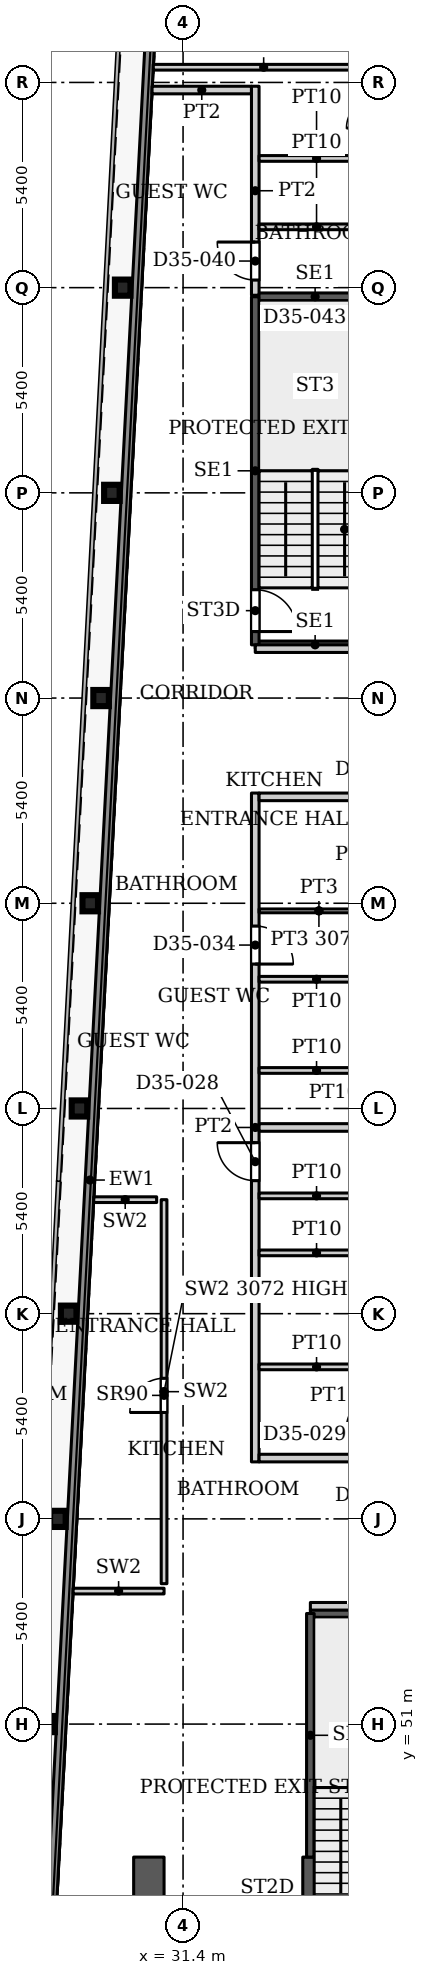
"""IFC4 building model, lengths in metres.
Left out: names, types, materials, properties, quantities, classifications, styles, units other than length and angle.
Written with IfcOpenShell. Run it as: python <this file> out.ifc"""

import sys

from ifc_helpers import new_model, si_unit, direction, frame, frame_2d, origin, origin_2d, place, context, subcontext, project, spatial, rectangle, i_section, extrude, source, transform, mapped, element, fill, save


model = new_model("IFC4")
c1 = context("Model", 3, precision=1e-05, world=origin(), true_north=direction((0.0, 1.0)))
c2 = subcontext(c1, "Body", "Model", "MODEL_VIEW")
j1 = project(units=[si_unit("LENGTHUNIT", "METRE"), si_unit("PLANEANGLEUNIT", "RADIAN")], contexts=[c1])
p1 = place(None, origin())
s1 = spatial("IfcSite", under=j1, at=p1, CompositionType="ELEMENT")
p2 = place(p1, origin())
s2 = spatial("IfcBuilding", under=s1, at=p2, CompositionType="ELEMENT")
p3 = place(p2, frame((0.0, 0.0, 152.6)))
s3 = spatial("IfcBuildingStorey", under=s2, at=p3, CompositionType="ELEMENT", Elevation=152.6)
for number, where, z_axis, x_axis in (
    (1, (27.822, 51.0, 0.0), (0.0, 0.0, 1.0), (1.0, 0.0, 0.0)),
    (2, (28.106, 56.4, 0.0), (0.0, 0.0, 1.0), (1.0, 0.0, 0.0)),
    (3, (28.39, 61.8, 0.0), (0.0, 0.0, 1.0), (1.0, 0.0, 0.0)),
    (4, (28.674, 67.2, 0.0), (0.0, 0.0, 1.0), (1.0, 0.0, 0.0)),
    (5, (28.958, 72.6, 0.0), (0.0, 0.0, 1.0), (1.0, 0.0, 0.0)),
    (6, (29.243, 78.0, 0.0), (0.0, 0.0, 1.0), (1.0, 0.0, 0.0)),
    (7, (29.527, 83.4, 0.0), (0.0, 0.0, 1.0), (1.0, 0.0, 0.0)),
    (8, (29.811, 88.8, 0.0), (0.0, 0.0, 1.0), (1.0, 0.0, 0.0)),
):
    element("IfcColumn", number, at=place(p3, frame(where, z_axis=z_axis, x_axis=x_axis)), inside=s3, PredefinedType="COLUMN", context=c2, shape_type="SweptSolid", body=[
        extrude(i_section(OverallWidth=0.409, OverallDepth=0.425, WebThickness=0.033, FlangeThickness=0.052, FilletRadius=0.013, at=origin_2d()), origin(), (0.0, 0.0, 1.0), 3.9),
    ])
p4 = place(p3, frame((34.75, 29.05, 0.0), z_axis=(0.0, 0.0, 1.0), x_axis=(0.0, 1.0, 0.0)))
e9 = element("IfcWall", 9, at=p4, inside=s3, PredefinedType="SHEAR", context=c2, shape_type="SweptSolid", body=[
    extrude(rectangle(XDim=18.45, YDim=0.4, at=frame_2d((9.225, 0.0))), origin(), (0.0, 0.0, 1.0), 3.9),
])
p5 = place(p4, frame((8.025, 0.0, 0.0)))
e10 = element("IfcOpeningElement", 10, at=p5, cuts=e9, PredefinedType="OPENING", context=c2, shape_type="SweptSolid", body=[
    extrude(rectangle(XDim=1.1, YDim=2.2, at=frame_2d((0.55, 1.1))), frame((0.0, 0.21, 0.0), z_axis=(0.0, -1.0, 0.0), x_axis=(1.0, 0.0, 0.0)), (0.0, 0.0, 1.0), 0.42),
])
p6 = place(p4, frame((10.875, 0.0, 0.0)))
e11 = element("IfcOpeningElement", 11, at=p6, cuts=e9, PredefinedType="OPENING", context=c2, shape_type="SweptSolid", body=[
    extrude(rectangle(XDim=1.1, YDim=2.2, at=frame_2d((0.55, 1.1))), frame((0.0, 0.21, 0.0), z_axis=(0.0, -1.0, 0.0), x_axis=(1.0, 0.0, 0.0)), (0.0, 0.0, 1.0), 0.42),
])
p7 = place(p4, frame((13.725, 0.0, 0.0)))
e12 = element("IfcOpeningElement", 12, at=p7, cuts=e9, PredefinedType="OPENING", context=c2, shape_type="SweptSolid", body=[
    extrude(rectangle(XDim=1.1, YDim=2.2, at=frame_2d((0.55, 1.1))), frame((0.0, 0.21, 0.0), z_axis=(0.0, -1.0, 0.0), x_axis=(1.0, 0.0, 0.0)), (0.0, 0.0, 1.0), 0.42),
])
p8 = place(p4, frame((15.95, 0.0, 0.0)))
e13 = element("IfcOpeningElement", 13, at=p8, cuts=e9, PredefinedType="OPENING", context=c2, shape_type="SweptSolid", body=[
    extrude(rectangle(XDim=1.1, YDim=2.2, at=frame_2d((0.55, 1.1))), frame((0.0, 0.21, 0.0), z_axis=(0.0, -1.0, 0.0), x_axis=(1.0, 0.0, 0.0)), (0.0, 0.0, 1.0), 0.42),
])
p9 = place(p3, frame((30.5, 29.05, 0.0), z_axis=(0.0, 0.0, 1.0), x_axis=(0.0, 1.0, 0.0)))
e14 = element("IfcWall", 14, at=p9, inside=s3, PredefinedType="SHEAR", context=c2, shape_type="SweptSolid", body=[
    extrude(rectangle(XDim=18.45, YDim=0.8, at=frame_2d((9.225, 0.0))), origin(), (0.0, 0.0, 1.0), 3.9),
])
p10 = place(p9, frame((6.55, 0.0, 0.0)))
e15 = element("IfcOpeningElement", 15, at=p10, cuts=e14, PredefinedType="OPENING", context=c2, shape_type="SweptSolid", body=[
    extrude(rectangle(XDim=0.9, YDim=2.2, at=frame_2d((0.45, 1.1))), frame((0.0, 0.41, 0.0), z_axis=(0.0, -1.0, 0.0), x_axis=(1.0, 0.0, 0.0)), (0.0, 0.0, 1.0), 0.82),
])
p11 = place(p9, frame((11.025, 0.0, 0.0)))
e16 = element("IfcOpeningElement", 16, at=p11, cuts=e14, PredefinedType="OPENING", context=c2, shape_type="SweptSolid", body=[
    extrude(rectangle(XDim=0.9, YDim=2.2, at=frame_2d((0.45, 1.1))), frame((0.0, 0.41, 0.0), z_axis=(0.0, -1.0, 0.0), x_axis=(1.0, 0.0, 0.0)), (0.0, 0.0, 1.0), 0.82),
])
p12 = place(p3, frame((27.195, 31.969, 0.0), z_axis=(0.0, 0.0, 1.0), x_axis=(0.052554995867, 0.998618031286, 0.0)))
e17 = element("IfcWall", 17, at=p12, inside=s3, PredefinedType="SOLIDWALL", context=c2, shape_type="SweptSolid", body=[
    extrude(rectangle(XDim=66.787, YDim=0.25, at=frame_2d((33.394, 0.0))), origin(), (0.0, 0.0, 1.0), 3.75),
])
p13 = place(p3, frame((34.75, 53.91, 0.0), z_axis=(0.0, 0.0, 1.0), x_axis=(1.0, 0.0, 0.0)))
e18 = element("IfcWall", 18, at=p13, inside=s3, PredefinedType="SHEAR", context=c2, shape_type="SweptSolid", body=[
    extrude(rectangle(XDim=3.15, YDim=0.2, at=frame_2d((1.575, 0.0))), origin(), (0.0, 0.0, 1.0), 3.9),
])
p14 = place(p3, frame((34.75, 47.5, 0.0), z_axis=(0.0, 0.0, 1.0), x_axis=(0.0, 1.0, 0.0)))
e19 = element("IfcWall", 19, at=p14, inside=s3, PredefinedType="SHEAR", context=c2, shape_type="SweptSolid", body=[
    extrude(rectangle(XDim=6.41, YDim=0.2, at=frame_2d((3.205, 0.0))), origin(), (0.0, 0.0, 1.0), 3.9),
])
for number, where, z_axis, x_axis in (
    (20, (33.3, 79.4, 0.0), (0.0, 0.0, 1.0), (1.0, 0.0, 0.0)),
    (21, (33.3, 88.56, 0.0), (0.0, 0.0, 1.0), (1.0, 0.0, 0.0)),
):
    element("IfcWall", number, at=place(p3, frame(where, z_axis=z_axis, x_axis=x_axis)), inside=s3, PredefinedType="SHEAR", context=c2, shape_type="SweptSolid", body=[
        extrude(rectangle(XDim=3.15, YDim=0.2, at=frame_2d((1.575, 0.0))), origin(), (0.0, 0.0, 1.0), 3.9),
    ])
p15 = place(p3, frame((33.3, 79.4, 0.0), z_axis=(0.0, 0.0, 1.0), x_axis=(0.0, 1.0, 0.0)))
e22 = element("IfcWall", 22, at=p15, inside=s3, PredefinedType="SHEAR", context=c2, shape_type="SweptSolid", body=[
    extrude(rectangle(XDim=9.16, YDim=0.2, at=frame_2d((4.58, 0.0))), origin(), (0.0, 0.0, 1.0), 3.9),
])
p16 = place(p15, frame((0.35, 0.0, 0.0)))
e23 = element("IfcOpeningElement", 23, at=p16, cuts=e22, PredefinedType="OPENING", context=c2, shape_type="SweptSolid", body=[
    extrude(rectangle(XDim=1.1, YDim=2.2, at=frame_2d((0.55, 1.1))), frame((0.0, 0.11, 0.0), z_axis=(0.0, -1.0, 0.0), x_axis=(1.0, 0.0, 0.0)), (0.0, 0.0, 1.0), 0.22),
])
p17 = place(p3, frame((28.508, 54.5, 0.0), z_axis=(0.0, 0.0, 1.0), x_axis=(1.0, 0.0, 0.0)))
e24 = element("IfcWall", 24, at=p17, inside=s3, PredefinedType="PARTITIONING", context=c2, shape_type="SweptSolid", body=[
    extrude(rectangle(XDim=2.392, YDim=0.15, at=frame_2d((1.196, 0.0))), origin(), (0.0, 0.0, 1.0), 3.9),
])
p18 = place(p3, frame((30.9, 54.695, 0.0), z_axis=(0.0, 0.0, 1.0), x_axis=(0.0, 1.0, 0.0)))
e25 = element("IfcWall", 25, at=p18, inside=s3, PredefinedType="PARTITIONING", context=c2, shape_type="SweptSolid", body=[
    extrude(rectangle(XDim=10.105, YDim=0.15, at=frame_2d((5.052, 0.0))), origin(), (0.0, 0.0, 1.0), 3.072),
])
p19 = place(p18, frame((4.505, 0.0, 0.0)))
e26 = element("IfcOpeningElement", 26, at=p19, cuts=e25, PredefinedType="OPENING", context=c2, shape_type="SweptSolid", body=[
    extrude(rectangle(XDim=0.9, YDim=2.2, at=frame_2d((0.45, 1.1))), frame((0.0, 0.085, 0.0), z_axis=(0.0, -1.0, 0.0), x_axis=(1.0, 0.0, 0.0)), (0.0, 0.0, 1.0), 0.17),
])
p20 = place(p3, frame((29.05, 64.8, 0.0), z_axis=(0.0, 0.0, 1.0), x_axis=(1.0, 0.0, 0.0)))
e27 = element("IfcWall", 27, at=p20, inside=s3, PredefinedType="PARTITIONING", context=c2, shape_type="SweptSolid", body=[
    extrude(rectangle(XDim=1.655, YDim=0.15, at=frame_2d((0.828, 0.0))), origin(), (0.0, 0.0, 1.0), 3.9),
])
p21 = place(p3, frame((30.617, 94.6, 0.0), z_axis=(0.0, 0.0, 1.0), x_axis=(1.0, 0.0, 0.0)))
e28 = element("IfcWall", 28, at=p21, inside=s3, PredefinedType="PARTITIONING", context=c2, shape_type="SweptSolid", body=[
    extrude(rectangle(XDim=5.808, YDim=0.15, at=frame_2d((2.904, 0.0))), origin(), (0.0, 0.0, 1.0), 3.6),
])
p22 = place(p3, frame((30.585, 94.0, 0.0), z_axis=(0.0, 0.0, 1.0), x_axis=(1.0, 0.0, 0.0)))
e29 = element("IfcWall", 29, at=p22, inside=s3, PredefinedType="PARTITIONING", context=c2, shape_type="SweptSolid", body=[
    extrude(rectangle(XDim=2.615, YDim=0.2, at=frame_2d((1.308, 0.0))), origin(), (0.0, 0.0, 1.0), 3.6),
])
p23 = place(p3, frame((33.3, 57.9, 0.0), z_axis=(0.0, 0.0, 1.0), x_axis=(0.0, 1.0, 0.0)))
e30 = element("IfcWall", 30, at=p23, inside=s3, PredefinedType="PARTITIONING", context=c2, shape_type="SweptSolid", body=[
    extrude(rectangle(XDim=17.6, YDim=0.2, at=frame_2d((8.8, 0.0))), origin(), (0.0, 0.0, 1.0), 3.6),
])
p24 = place(p23, frame((7.4, 0.0, 0.0)))
e31 = element("IfcOpeningElement", 31, at=p24, cuts=e30, PredefinedType="OPENING", context=c2, shape_type="SweptSolid", body=[
    extrude(rectangle(XDim=1.0, YDim=2.1, at=frame_2d((0.5, 1.05))), frame((0.0, 0.11, 0.0), z_axis=(0.0, -1.0, 0.0), x_axis=(1.0, 0.0, 0.0)), (0.0, 0.0, 1.0), 0.22),
])
p25 = place(p23, frame((13.1, 0.0, 0.0)))
e32 = element("IfcOpeningElement", 32, at=p25, cuts=e30, PredefinedType="OPENING", context=c2, shape_type="SweptSolid", body=[
    extrude(rectangle(XDim=1.0, YDim=2.1, at=frame_2d((0.5, 1.05))), frame((0.0, 0.11, 0.0), z_axis=(0.0, -1.0, 0.0), x_axis=(1.0, 0.0, 0.0)), (0.0, 0.0, 1.0), 0.22),
])
p26 = place(p3, frame((33.3, 79.3, 0.0), z_axis=(0.0, 0.0, 1.0), x_axis=(1.0, 0.0, 0.0)))
e33 = element("IfcWall", 33, at=p26, inside=s3, PredefinedType="PARTITIONING", context=c2, shape_type="SweptSolid", body=[
    extrude(rectangle(XDim=12.6, YDim=0.2, at=frame_2d((6.3, 0.0))), origin(), (0.0, 0.0, 1.0), 3.6),
])
p27 = place(p26, frame((5.795, 0.0, 0.0)))
e34 = element("IfcOpeningElement", 34, at=p27, cuts=e33, PredefinedType="OPENING", context=c2, shape_type="SweptSolid", body=[
    extrude(rectangle(XDim=1.0, YDim=2.1, at=frame_2d((0.5, 1.05))), frame((0.0, 0.11, 0.0), z_axis=(0.0, -1.0, 0.0), x_axis=(1.0, 0.0, 0.0)), (0.0, 0.0, 1.0), 0.22),
])
p28 = place(p3, frame((33.3, 88.6, 0.0), z_axis=(0.0, 0.0, 1.0), x_axis=(0.0, 1.0, 0.0)))
e35 = element("IfcWall", 35, at=p28, inside=s3, PredefinedType="PARTITIONING", context=c2, shape_type="SweptSolid", body=[
    extrude(rectangle(XDim=5.5, YDim=0.2, at=frame_2d((2.75, 0.0))), origin(), (0.0, 0.0, 1.0), 3.6),
])
p29 = place(p28, frame((0.4, 0.0, 0.0)))
e36 = element("IfcOpeningElement", 36, at=p29, cuts=e35, PredefinedType="OPENING", context=c2, shape_type="SweptSolid", body=[
    extrude(rectangle(XDim=1.0, YDim=2.1, at=frame_2d((0.5, 1.05))), frame((0.0, 0.11, 0.0), z_axis=(0.0, -1.0, 0.0), x_axis=(1.0, 0.0, 0.0)), (0.0, 0.0, 1.0), 0.22),
])
p30 = place(p3, frame((33.4, 58.0, 0.0), z_axis=(0.0, 0.0, 1.0), x_axis=(1.0, 0.0, 0.0)))
e37 = element("IfcWall", 37, at=p30, inside=s3, PredefinedType="PARTITIONING", context=c2, shape_type="SweptSolid", body=[
    extrude(rectangle(XDim=12.5, YDim=0.2, at=frame_2d((6.25, 0.0))), origin(), (0.0, 0.0, 1.0), 3.6),
])
for number, where, z_axis, x_axis in (
    (38, (33.4, 60.4, 0.0), (0.0, 0.0, 1.0), (1.0, 0.0, 0.0)),
    (39, (33.4, 63.4, 0.0), (0.0, 0.0, 1.0), (1.0, 0.0, 0.0)),
    (40, (33.4, 64.9, 0.0), (0.0, 0.0, 1.0), (1.0, 0.0, 0.0)),
):
    element("IfcWall", number, at=place(p3, frame(where, z_axis=z_axis, x_axis=x_axis)), inside=s3, PredefinedType="PARTITIONING", context=c2, shape_type="SweptSolid", body=[
        extrude(rectangle(XDim=3.025, YDim=0.15, at=frame_2d((1.513, 0.0))), origin(), (0.0, 0.0, 1.0), 3.6),
    ])
p31 = place(p3, frame((33.4, 66.7, 0.0), z_axis=(0.0, 0.0, 1.0), x_axis=(1.0, 0.0, 0.0)))
e41 = element("IfcWall", 41, at=p31, inside=s3, PredefinedType="PARTITIONING", context=c2, shape_type="SweptSolid", body=[
    extrude(rectangle(XDim=12.5, YDim=0.2, at=frame_2d((6.25, 0.0))), origin(), (0.0, 0.0, 1.0), 3.6),
])
for number, where, z_axis, x_axis in (
    (42, (33.4, 68.2, 0.0), (0.0, 0.0, 1.0), (1.0, 0.0, 0.0)),
    (43, (33.4, 70.6, 0.0), (0.0, 0.0, 1.0), (1.0, 0.0, 0.0)),
):
    element("IfcWall", number, at=place(p3, frame(where, z_axis=z_axis, x_axis=x_axis)), inside=s3, PredefinedType="PARTITIONING", context=c2, shape_type="SweptSolid", body=[
        extrude(rectangle(XDim=3.025, YDim=0.15, at=frame_2d((1.513, 0.0))), origin(), (0.0, 0.0, 1.0), 3.6),
    ])
p32 = place(p3, frame((33.4, 72.4, 0.0), z_axis=(0.0, 0.0, 1.0), x_axis=(1.0, 0.0, 0.0)))
e44 = element("IfcWall", 44, at=p32, inside=s3, PredefinedType="PARTITIONING", context=c2, shape_type="SweptSolid", body=[
    extrude(rectangle(XDim=3.15, YDim=0.1, at=frame_2d((1.575, 0.0))), origin(), (0.0, 0.0, 1.0), 3.072),
])
p33 = place(p3, frame((33.4, 75.4, 0.0), z_axis=(0.0, 0.0, 1.0), x_axis=(1.0, 0.0, 0.0)))
e45 = element("IfcWall", 45, at=p33, inside=s3, PredefinedType="PARTITIONING", context=c2, shape_type="SweptSolid", body=[
    extrude(rectangle(XDim=12.5, YDim=0.2, at=frame_2d((6.25, 0.0))), origin(), (0.0, 0.0, 1.0), 3.6),
])
for number, where, z_axis, x_axis in (
    (46, (33.4, 90.4, 0.0), (0.0, 0.0, 1.0), (1.0, 0.0, 0.0)),
    (47, (33.4, 92.2, 0.0), (0.0, 0.0, 1.0), (1.0, 0.0, 0.0)),
):
    element("IfcWall", number, at=place(p3, frame(where, z_axis=z_axis, x_axis=x_axis)), inside=s3, PredefinedType="PARTITIONING", context=c2, shape_type="SweptSolid", body=[
        extrude(rectangle(XDim=3.025, YDim=0.15, at=frame_2d((1.513, 0.0))), origin(), (0.0, 0.0, 1.0), 3.6),
    ])
p34 = place(p3, frame((34.75, 54.1, 0.0), z_axis=(0.0, 0.0, 1.0), x_axis=(1.0, 0.0, 0.0)))
e48 = element("IfcWall", 48, at=p34, inside=s3, PredefinedType="PARTITIONING", context=c2, shape_type="SweptSolid", body=[
    extrude(rectangle(XDim=11.15, YDim=0.2, at=frame_2d((5.575, 0.0))), origin(), (0.0, 0.0, 1.0), 3.6),
])
p35 = place(p34, frame((5.075, 0.0, 0.0)))
e49 = element("IfcOpeningElement", 49, at=p35, cuts=e48, PredefinedType="OPENING", context=c2, shape_type="SweptSolid", body=[
    extrude(rectangle(XDim=1.0, YDim=2.1, at=frame_2d((0.5, 1.05))), frame((0.0, 0.11, 0.0), z_axis=(0.0, -1.0, 0.0), x_axis=(1.0, 0.0, 0.0)), (0.0, 0.0, 1.0), 0.22),
])
m1 = source(origin(), c2, "Body", "SweptSolid", [
    extrude(rectangle(XDim=0.9, YDim=2.2, at=frame_2d((0.45, 1.1))), frame((0.0, 0.025, 0.0), z_axis=(0.0, -1.0, 0.0), x_axis=(1.0, 0.0, 0.0)), (0.0, 0.0, 1.0), 0.05),
])
p36 = place(p19, origin())
e50 = element("IfcDoor", 50, at=p36, inside=s3, OperationType="SINGLE_SWING_LEFT", PredefinedType="DOOR", context=c2, shape_type="MappedRepresentation", body=[
    mapped(m1, transform((0.0, 0.0, 0.0), x_axis=(1.0, 0.0, 0.0), y_axis=(0.0, 1.0, 0.0), z_axis=(0.0, 0.0, 1.0), scale=1.0)),
])
fill(e26, e50)
m2 = source(origin(), c2, "Body", "SweptSolid", [
    extrude(rectangle(XDim=1.1, YDim=2.2, at=frame_2d((0.55, 1.1))), frame((0.0, 0.025, 0.0), z_axis=(0.0, -1.0, 0.0), x_axis=(1.0, 0.0, 0.0)), (0.0, 0.0, 1.0), 0.05),
])
p37 = place(p16, origin())
e51 = element("IfcDoor", 51, at=p37, inside=s3, OperationType="SINGLE_SWING_RIGHT", PredefinedType="DOOR", context=c2, shape_type="MappedRepresentation", body=[
    mapped(m2, transform((0.0, 0.0, 0.0), x_axis=(1.0, 0.0, 0.0), y_axis=(0.0, 1.0, 0.0), z_axis=(0.0, 0.0, 1.0), scale=1.0)),
])
fill(e23, e51)
m3 = source(origin(), c2, "Body", "SweptSolid", [
    extrude(rectangle(XDim=1.0, YDim=2.1, at=frame_2d((0.5, 1.05))), frame((0.0, 0.025, 0.0), z_axis=(0.0, -1.0, 0.0), x_axis=(1.0, 0.0, 0.0)), (0.0, 0.0, 1.0), 0.05),
])
p38 = place(p24, origin())
e52 = element("IfcDoor", 52, at=p38, inside=s3, OperationType="SINGLE_SWING_LEFT", PredefinedType="DOOR", context=c2, shape_type="MappedRepresentation", body=[
    mapped(m3, transform((0.0, 0.0, 0.0), x_axis=(1.0, 0.0, 0.0), y_axis=(0.0, 1.0, 0.0), z_axis=(0.0, 0.0, 1.0), scale=1.0)),
])
fill(e31, e52)
p39 = place(p25, origin())
e53 = element("IfcDoor", 53, at=p39, inside=s3, OperationType="SINGLE_SWING_RIGHT", PredefinedType="DOOR", context=c2, shape_type="MappedRepresentation", body=[
    mapped(m3, transform((0.0, 0.0, 0.0), x_axis=(1.0, 0.0, 0.0), y_axis=(0.0, 1.0, 0.0), z_axis=(0.0, 0.0, 1.0), scale=1.0)),
])
fill(e32, e53)
p40 = place(p29, origin())
e54 = element("IfcDoor", 54, at=p40, inside=s3, OperationType="SINGLE_SWING_LEFT", PredefinedType="DOOR", context=c2, shape_type="MappedRepresentation", body=[
    mapped(m3, transform((0.0, 0.0, 0.0), x_axis=(1.0, 0.0, 0.0), y_axis=(0.0, 1.0, 0.0), z_axis=(0.0, 0.0, 1.0), scale=1.0)),
])
fill(e36, e54)
save(model, sys.argv[1])
